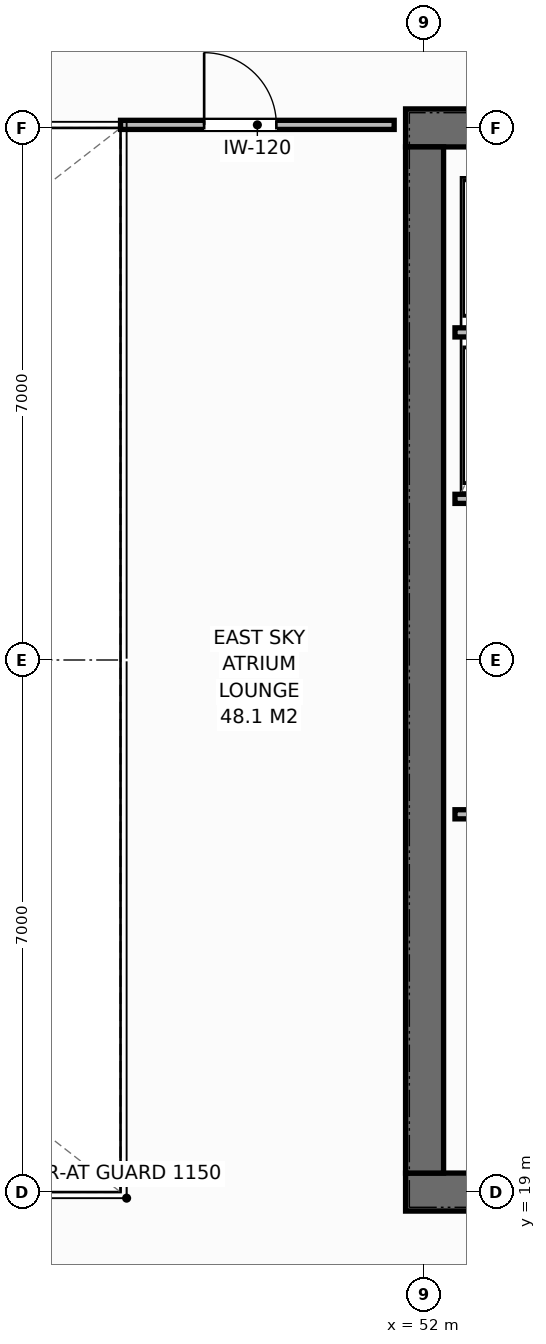
"""IFC4 building model, lengths in metres.
Left out: names, types, materials, properties, quantities, classifications, styles, units other than length and angle.
Written with IfcOpenShell. Run it as: python <this file> out.ifc"""

import sys

from ifc_helpers import new_model, si_unit, direction, frame, frame_2d, origin, place, context, subcontext, project, spatial, rectangle, extrude, element, fill, save


model = new_model("IFC4")
c1 = context("Model", 3, precision=1e-05, world=origin(), true_north=direction((0.0, 1.0)))
c2 = subcontext(c1, "Body", "Model", "MODEL_VIEW")
j1 = project(units=[si_unit("LENGTHUNIT", "METRE"), si_unit("PLANEANGLEUNIT", "RADIAN")], contexts=[c1])
p1 = place(None, origin())
s1 = spatial("IfcSite", under=j1, at=p1, CompositionType="ELEMENT")
p2 = place(p1, origin())
s2 = spatial("IfcBuilding", under=s1, at=p2, CompositionType="ELEMENT")
p3 = place(p2, frame((0.0, 0.0, 240.4)))
s3 = spatial("IfcBuildingStorey", under=s2, at=p3, CompositionType="ELEMENT", Elevation=240.4)
p4 = place(p3, frame((51.75, 19.0, 0.0), z_axis=(0.0, 0.0, 1.0), x_axis=(1.0, 0.0, 0.0)))
e1 = element("IfcWall", 1, at=p4, inside=s3, PredefinedType="SHEAR", context=c2, shape_type="SweptSolid", body=[
    extrude(rectangle(XDim=13.5, YDim=0.5, at=frame_2d((6.75, 0.0))), origin(), (0.0, 0.0, 1.0), 3.8),
])
p5 = place(p4, frame((2.97, 0.0, 0.0)))
e2 = element("IfcOpeningElement", 2, at=p5, cuts=e1, PredefinedType="OPENING", context=c2, shape_type="SweptSolid", body=[
    extrude(rectangle(XDim=1.4, YDim=2.2, at=frame_2d((0.7, 1.1))), frame((0.0, 0.26, 0.0), z_axis=(0.0, -1.0, 0.0), x_axis=(1.0, 0.0, 0.0)), (0.0, 0.0, 1.0), 0.52),
])
p6 = place(p3, frame((51.75, 33.0, 0.0), z_axis=(0.0, 0.0, 1.0), x_axis=(1.0, 0.0, 0.0)))
e3 = element("IfcWall", 3, at=p6, inside=s3, PredefinedType="SHEAR", context=c2, shape_type="SweptSolid", body=[
    extrude(rectangle(XDim=13.5, YDim=0.5, at=frame_2d((6.75, 0.0))), origin(), (0.0, 0.0, 1.0), 3.8),
])
p7 = place(p6, frame((2.97, 0.0, 0.0)))
e4 = element("IfcOpeningElement", 4, at=p7, cuts=e3, PredefinedType="OPENING", context=c2, shape_type="SweptSolid", body=[
    extrude(rectangle(XDim=1.4, YDim=2.2, at=frame_2d((0.7, 1.1))), frame((0.0, 0.26, 0.0), z_axis=(0.0, -1.0, 0.0), x_axis=(1.0, 0.0, 0.0)), (0.0, 0.0, 1.0), 0.52),
])
p8 = place(p6, frame((10.85, 0.0, 0.0)))
e5 = element("IfcOpeningElement", 5, at=p8, cuts=e3, PredefinedType="OPENING", context=c2, shape_type="SweptSolid", body=[
    extrude(rectangle(XDim=0.9, YDim=2.15, at=frame_2d((0.45, 1.075))), frame((0.0, 0.26, 0.0), z_axis=(0.0, -1.0, 0.0), x_axis=(1.0, 0.0, 0.0)), (0.0, 0.0, 1.0), 0.52),
])
p9 = place(p6, frame((5.8, 0.0, 0.0)))
e6 = element("IfcOpeningElement", 6, at=p9, cuts=e3, PredefinedType="OPENING", context=c2, shape_type="SweptSolid", body=[
    extrude(rectangle(XDim=0.9, YDim=2.15, at=frame_2d((0.45, 1.075))), frame((0.0, 0.26, 0.0), z_axis=(0.0, -1.0, 0.0), x_axis=(1.0, 0.0, 0.0)), (0.0, 0.0, 1.0), 0.52),
])
p10 = place(p6, frame((8.2, 0.0, 0.0)))
e7 = element("IfcOpeningElement", 7, at=p10, cuts=e3, PredefinedType="OPENING", context=c2, shape_type="SweptSolid", body=[
    extrude(rectangle(XDim=0.95, YDim=2.15, at=frame_2d((0.475, 1.075))), frame((0.0, 0.26, 0.0), z_axis=(0.0, -1.0, 0.0), x_axis=(1.0, 0.0, 0.0)), (0.0, 0.0, 1.0), 0.52),
])
p11 = place(p3, frame((52.0, 19.25, 0.0), z_axis=(0.0, 0.0, 1.0), x_axis=(0.0, 1.0, 0.0)))
e8 = element("IfcWall", 8, at=p11, inside=s3, PredefinedType="SHEAR", context=c2, shape_type="SweptSolid", body=[
    extrude(rectangle(XDim=13.5, YDim=0.5, at=frame_2d((6.75, 0.0))), origin(), (0.0, 0.0, 1.0), 3.8),
])
for number, where, z_axis, x_axis in (
    (9, (52.4, 23.97, 0.0), (0.0, 0.0, 1.0), (1.0, 0.0, 0.0)),
    (10, (52.4, 28.12, 0.0), (0.0, 0.0, 1.0), (1.0, 0.0, 0.0)),
    (11, (52.4, 30.31, 0.0), (0.0, 0.0, 1.0), (1.0, 0.0, 0.0)),
):
    element("IfcWall", number, at=place(p3, frame(where, z_axis=z_axis, x_axis=x_axis)), inside=s3, PredefinedType="PARTITIONING", context=c2, shape_type="SweptSolid", body=[
        extrude(rectangle(XDim=2.2, YDim=0.12, at=frame_2d((1.1, 0.0))), origin(), (0.0, 0.0, 1.0), 3.58),
    ])
p12 = place(p3, frame((48.0, 33.04, 0.0), z_axis=(0.0, 0.0, 1.0), x_axis=(1.0, 0.0, 0.0)))
e12 = element("IfcWall", 12, at=p12, inside=s3, PredefinedType="PARTITIONING", context=c2, shape_type="SweptSolid", body=[
    extrude(rectangle(XDim=3.6, YDim=0.12, at=frame_2d((1.8, 0.0))), origin(), (0.0, 0.0, 1.0), 3.32),
])
p13 = place(p12, frame((1.1, 0.0, 0.0)))
e13 = element("IfcOpeningElement", 13, at=p13, cuts=e12, PredefinedType="OPENING", context=c2, shape_type="SweptSolid", body=[
    extrude(rectangle(XDim=0.95, YDim=2.15, at=frame_2d((0.475, 1.075))), frame((0.0, 0.07, 0.0), z_axis=(0.0, -1.0, 0.0), x_axis=(1.0, 0.0, 0.0)), (0.0, 0.0, 1.0), 0.14),
])
p14 = place(p13, origin())
e14 = element("IfcDoor", 14, at=p14, inside=s3, OperationType="SINGLE_SWING_LEFT", PredefinedType="DOOR", context=c2, shape_type="SweptSolid", body=[
    extrude(rectangle(XDim=0.95, YDim=2.15, at=frame_2d((0.475, 1.075))), frame((0.0, 0.025, 0.0), z_axis=(0.0, -1.0, 0.0), x_axis=(1.0, 0.0, 0.0)), (0.0, 0.0, 1.0), 0.05),
])
fill(e13, e14)
save(model, sys.argv[1])
